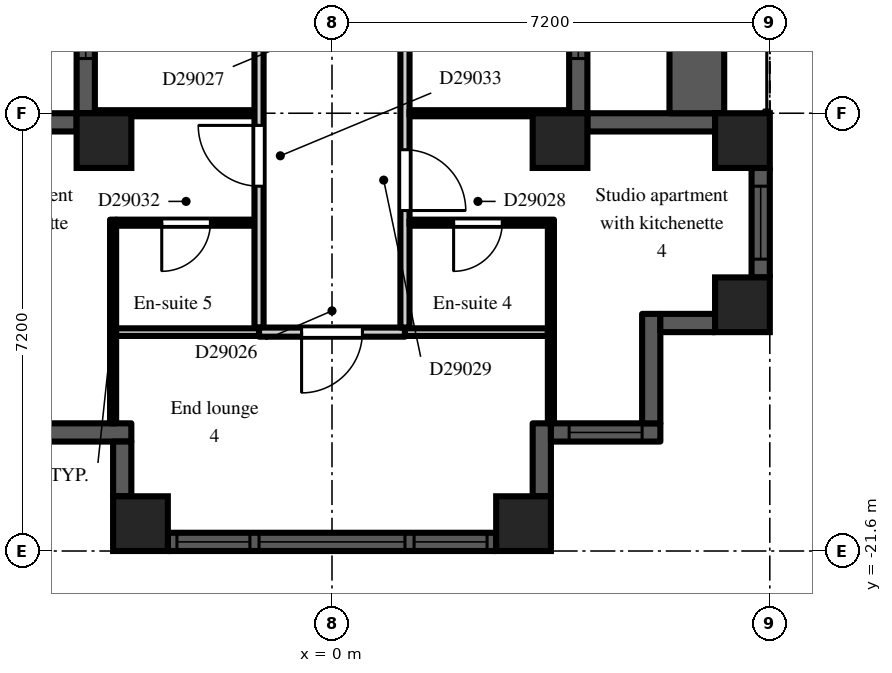
"""IFC4 building model, lengths in metres.
Left out: names, types, materials, properties, quantities, classifications, styles, units other than length and angle.
Written with IfcOpenShell. Run it as: python <this file> out.ifc"""

import sys

from ifc_helpers import new_model, si_unit, direction, frame, frame_2d, origin, origin_2d, place, context, subcontext, project, spatial, rectangle, extrude, element, fill, save


model = new_model("IFC4")
c1 = context("Model", 3, precision=1e-05, world=origin(), true_north=direction((0.0, 1.0)))
c2 = subcontext(c1, "Body", "Model", "MODEL_VIEW")
j1 = project(units=[si_unit("LENGTHUNIT", "METRE"), si_unit("PLANEANGLEUNIT", "RADIAN")], contexts=[c1])
p1 = place(None, origin())
s1 = spatial("IfcSite", under=j1, at=p1, CompositionType="ELEMENT")
p2 = place(p1, origin())
s2 = spatial("IfcBuilding", under=s1, at=p2, CompositionType="ELEMENT")
p3 = place(p2, frame((0.0, 0.0, 201.9)))
s3 = spatial("IfcBuildingStorey", under=s2, at=p3, CompositionType="ELEMENT", Elevation=201.9)
for number, where, z_axis, x_axis in (
    (1, (-3.75, -14.85, 0.0), (0.0, 0.0, 1.0), (1.0, 0.0, 0.0)),
    (2, (-3.15, -21.15, 0.0), (0.0, 0.0, 1.0), (1.0, 0.0, 0.0)),
    (3, (3.15, -21.15, 0.0), (0.0, 0.0, 1.0), (1.0, 0.0, 0.0)),
    (4, (3.75, -14.85, 0.0), (0.0, 0.0, 1.0), (1.0, 0.0, 0.0)),
    (5, (6.75, -17.55, 0.0), (0.0, 0.0, 1.0), (1.0, 0.0, 0.0)),
    (6, (6.75, -14.85, 0.0), (0.0, 0.0, 1.0), (1.0, 0.0, 0.0)),
):
    element("IfcColumn", number, at=place(p3, frame(where, z_axis=z_axis, x_axis=x_axis)), inside=s3, PredefinedType="COLUMN", context=c2, shape_type="SweptSolid", body=[
        extrude(rectangle(XDim=0.9, YDim=0.9, at=origin_2d()), origin(), (0.0, 0.0, 1.0), 3.0),
    ])
p4 = place(p3, frame((-4.05, -7.2, 0.0), z_axis=(0.0, 0.0, 1.0), x_axis=(0.0, -1.0, 0.0)))
e7 = element("IfcWall", 7, at=p4, inside=s3, PredefinedType="SOLIDWALL", context=c2, shape_type="SweptSolid", body=[
    extrude(rectangle(XDim=7.2, YDim=0.3, at=frame_2d((3.6, 0.0))), origin(), (0.0, 0.0, 1.0), 2.3),
])
p5 = place(p4, frame((3.0, 0.0, 0.0)))
e8 = element("IfcOpeningElement", 8, at=p5, cuts=e7, PredefinedType="OPENING", context=c2, shape_type="SweptSolid", body=[
    extrude(rectangle(XDim=1.2, YDim=2.05, at=frame_2d((0.6, 1.025))), frame((0.0, 0.16, 0.0), z_axis=(0.0, -1.0, 0.0), x_axis=(1.0, 0.0, 0.0)), (0.0, 0.0, 1.0), 0.32),
])
p6 = place(p4, frame((0.9, 0.0, 0.2)))
e9 = element("IfcOpeningElement", 9, at=p6, cuts=e7, PredefinedType="OPENING", context=c2, shape_type="SweptSolid", body=[
    extrude(rectangle(XDim=1.8, YDim=1.85, at=frame_2d((0.9, 0.925))), frame((0.0, 0.16, 0.0), z_axis=(0.0, -1.0, 0.0), x_axis=(1.0, 0.0, 0.0)), (0.0, 0.0, 1.0), 0.32),
])
p7 = place(p4, frame((4.5, 0.0, 0.2)))
e10 = element("IfcOpeningElement", 10, at=p7, cuts=e7, PredefinedType="OPENING", context=c2, shape_type="SweptSolid", body=[
    extrude(rectangle(XDim=1.8, YDim=1.85, at=frame_2d((0.9, 0.925))), frame((0.0, 0.16, 0.0), z_axis=(0.0, -1.0, 0.0), x_axis=(1.0, 0.0, 0.0)), (0.0, 0.0, 1.0), 0.32),
])
p8 = place(p3, frame((-4.2, -14.55, 0.0), z_axis=(0.0, 0.0, 1.0), x_axis=(-1.0, 0.0, 0.0)))
e11 = element("IfcWall", 11, at=p8, inside=s3, PredefinedType="SOLIDWALL", context=c2, shape_type="SweptSolid", body=[
    extrude(rectangle(XDim=2.1, YDim=0.3, at=frame_2d((1.05, 0.0))), origin(), (0.0, 0.0, 1.0), 2.3),
])
p9 = place(p3, frame((-5.1, -19.65, 0.0), z_axis=(0.0, 0.0, 1.0), x_axis=(1.0, 0.0, 0.0)))
e12 = element("IfcWall", 12, at=p9, inside=s3, PredefinedType="SOLIDWALL", context=c2, shape_type="SweptSolid", body=[
    extrude(rectangle(XDim=1.8, YDim=0.3, at=frame_2d((0.9, 0.0))), origin(), (0.0, 0.0, 1.0), 2.6),
])
p10 = place(p3, frame((-3.45, -19.8, 0.0), z_axis=(0.0, 0.0, 1.0), x_axis=(0.0, -1.0, 0.0)))
e13 = element("IfcWall", 13, at=p10, inside=s3, PredefinedType="SOLIDWALL", context=c2, shape_type="SweptSolid", body=[
    extrude(rectangle(XDim=0.9, YDim=0.3, at=frame_2d((0.45, 0.0))), origin(), (0.0, 0.0, 1.0), 2.6),
])
p11 = place(p3, frame((-2.7, -21.45, 0.0), z_axis=(0.0, 0.0, 1.0), x_axis=(1.0, 0.0, 0.0)))
e14 = element("IfcWall", 14, at=p11, inside=s3, PredefinedType="SOLIDWALL", context=c2, shape_type="SweptSolid", body=[
    extrude(rectangle(XDim=5.4, YDim=0.3, at=frame_2d((2.7, 0.0))), origin(), (0.0, 0.0, 1.0), 2.3),
])
p12 = place(p11, frame((1.5, 0.0, 0.2)))
e15 = element("IfcOpeningElement", 15, at=p12, cuts=e14, PredefinedType="OPENING", context=c2, shape_type="SweptSolid", body=[
    extrude(rectangle(XDim=2.4, YDim=1.85, at=frame_2d((1.2, 0.925))), frame((0.0, 0.16, 0.0), z_axis=(0.0, -1.0, 0.0), x_axis=(1.0, 0.0, 0.0)), (0.0, 0.0, 1.0), 0.32),
])
p13 = place(p11, frame((0.15, 0.0, 0.2)))
e16 = element("IfcOpeningElement", 16, at=p13, cuts=e14, PredefinedType="OPENING", context=c2, shape_type="SweptSolid", body=[
    extrude(rectangle(XDim=1.2, YDim=1.85, at=frame_2d((0.6, 0.925))), frame((0.0, 0.16, 0.0), z_axis=(0.0, -1.0, 0.0), x_axis=(1.0, 0.0, 0.0)), (0.0, 0.0, 1.0), 0.32),
])
p14 = place(p11, frame((4.05, 0.0, 0.2)))
e17 = element("IfcOpeningElement", 17, at=p14, cuts=e14, PredefinedType="OPENING", context=c2, shape_type="SweptSolid", body=[
    extrude(rectangle(XDim=1.2, YDim=1.85, at=frame_2d((0.6, 0.925))), frame((0.0, 0.16, 0.0), z_axis=(0.0, -1.0, 0.0), x_axis=(1.0, 0.0, 0.0)), (0.0, 0.0, 1.0), 0.32),
])
p15 = place(p3, frame((3.45, -20.7, 0.0), z_axis=(0.0, 0.0, 1.0), x_axis=(0.0, 1.0, 0.0)))
e18 = element("IfcWall", 18, at=p15, inside=s3, PredefinedType="SOLIDWALL", context=c2, shape_type="SweptSolid", body=[
    extrude(rectangle(XDim=1.2, YDim=0.3, at=frame_2d((0.6, 0.0))), origin(), (0.0, 0.0, 1.0), 2.6),
])
p16 = place(p3, frame((3.6, -19.65, 0.0), z_axis=(0.0, 0.0, 1.0), x_axis=(1.0, 0.0, 0.0)))
e19 = element("IfcWall", 19, at=p16, inside=s3, PredefinedType="SOLIDWALL", context=c2, shape_type="SweptSolid", body=[
    extrude(rectangle(XDim=1.8, YDim=0.3, at=frame_2d((0.9, 0.0))), origin(), (0.0, 0.0, 1.0), 2.6),
])
p17 = place(p16, frame((0.3, 0.0, 0.2)))
e20 = element("IfcOpeningElement", 20, at=p17, cuts=e19, PredefinedType="OPENING", context=c2, shape_type="SweptSolid", body=[
    extrude(rectangle(XDim=1.2, YDim=1.85, at=frame_2d((0.6, 0.925))), frame((0.0, 0.16, 0.0), z_axis=(0.0, -1.0, 0.0), x_axis=(1.0, 0.0, 0.0)), (0.0, 0.0, 1.0), 0.32),
])
p18 = place(p3, frame((5.25, -19.5, 0.0), z_axis=(0.0, 0.0, 1.0), x_axis=(0.0, 1.0, 0.0)))
e21 = element("IfcWall", 21, at=p18, inside=s3, PredefinedType="SOLIDWALL", context=c2, shape_type="SweptSolid", body=[
    extrude(rectangle(XDim=1.8, YDim=0.3, at=frame_2d((0.9, 0.0))), origin(), (0.0, 0.0, 1.0), 2.6),
])
p19 = place(p3, frame((5.4, -17.85, 0.0), z_axis=(0.0, 0.0, 1.0), x_axis=(1.0, 0.0, 0.0)))
e22 = element("IfcWall", 22, at=p19, inside=s3, PredefinedType="SOLIDWALL", context=c2, shape_type="SweptSolid", body=[
    extrude(rectangle(XDim=0.9, YDim=0.3, at=frame_2d((0.45, 0.0))), origin(), (0.0, 0.0, 1.0), 2.6),
])
p20 = place(p3, frame((7.05, -17.1, 0.0), z_axis=(0.0, 0.0, 1.0), x_axis=(0.0, 1.0, 0.0)))
e23 = element("IfcWall", 23, at=p20, inside=s3, PredefinedType="SOLIDWALL", context=c2, shape_type="SweptSolid", body=[
    extrude(rectangle(XDim=1.8, YDim=0.3, at=frame_2d((0.9, 0.0))), origin(), (0.0, 0.0, 1.0), 2.3),
])
p21 = place(p20, frame((0.3, 0.0, 0.2)))
e24 = element("IfcOpeningElement", 24, at=p21, cuts=e23, PredefinedType="OPENING", context=c2, shape_type="SweptSolid", body=[
    extrude(rectangle(XDim=1.2, YDim=1.85, at=frame_2d((0.6, 0.925))), frame((0.0, 0.16, 0.0), z_axis=(0.0, -1.0, 0.0), x_axis=(1.0, 0.0, 0.0)), (0.0, 0.0, 1.0), 0.32),
])
p22 = place(p3, frame((6.3, -14.55, 0.0), z_axis=(0.0, 0.0, 1.0), x_axis=(-1.0, 0.0, 0.0)))
e25 = element("IfcWall", 25, at=p22, inside=s3, PredefinedType="SOLIDWALL", context=c2, shape_type="SweptSolid", body=[
    extrude(rectangle(XDim=2.1, YDim=0.3, at=frame_2d((1.05, 0.0))), origin(), (0.0, 0.0, 1.0), 2.3),
])
p23 = place(p3, frame((4.05, -14.4, 0.0), z_axis=(0.0, 0.0, 1.0), x_axis=(0.0, 1.0, 0.0)))
e26 = element("IfcWall", 26, at=p23, inside=s3, PredefinedType="SOLIDWALL", context=c2, shape_type="SweptSolid", body=[
    extrude(rectangle(XDim=7.2, YDim=0.3, at=frame_2d((3.6, 0.0))), origin(), (0.0, 0.0, 1.0), 2.3),
])
p24 = place(p23, frame((3.0, 0.0, 0.0)))
e27 = element("IfcOpeningElement", 27, at=p24, cuts=e26, PredefinedType="OPENING", context=c2, shape_type="SweptSolid", body=[
    extrude(rectangle(XDim=1.2, YDim=2.05, at=frame_2d((0.6, 1.025))), frame((0.0, 0.16, 0.0), z_axis=(0.0, -1.0, 0.0), x_axis=(1.0, 0.0, 0.0)), (0.0, 0.0, 1.0), 0.32),
])
p25 = place(p23, frame((0.9, 0.0, 0.2)))
e28 = element("IfcOpeningElement", 28, at=p25, cuts=e26, PredefinedType="OPENING", context=c2, shape_type="SweptSolid", body=[
    extrude(rectangle(XDim=1.8, YDim=1.85, at=frame_2d((0.9, 0.925))), frame((0.0, 0.16, 0.0), z_axis=(0.0, -1.0, 0.0), x_axis=(1.0, 0.0, 0.0)), (0.0, 0.0, 1.0), 0.32),
])
p26 = place(p23, frame((4.5, 0.0, 0.2)))
e29 = element("IfcOpeningElement", 29, at=p26, cuts=e26, PredefinedType="OPENING", context=c2, shape_type="SweptSolid", body=[
    extrude(rectangle(XDim=1.8, YDim=1.85, at=frame_2d((0.9, 0.925))), frame((0.0, 0.16, 0.0), z_axis=(0.0, -1.0, 0.0), x_axis=(1.0, 0.0, 0.0)), (0.0, 0.0, 1.0), 0.32),
])
p27 = place(p3, frame((6.0, -14.4, 0.0), z_axis=(0.0, 0.0, 1.0), x_axis=(0.0, 1.0, 0.0)))
e30 = element("IfcWall", 30, at=p27, inside=s3, PredefinedType="PARAPET", context=c2, shape_type="SweptSolid", body=[
    extrude(rectangle(XDim=7.2, YDim=0.9, at=frame_2d((3.6, 0.0))), origin(), (0.0, 0.0, 1.0), 0.8),
])
p28 = place(p3, frame((-3.9, -14.4, 0.0), z_axis=(0.0, 0.0, 1.0), x_axis=(1.0, 0.0, 0.0)))
e31 = element("IfcWall", 31, at=p28, inside=s3, PredefinedType="PARTITIONING", context=c2, shape_type="SweptSolid", body=[
    extrude(rectangle(XDim=2.625, YDim=0.1, at=frame_2d((1.312, 0.0))), origin(), (0.0, 0.0, 1.0), 2.6),
])
p29 = place(p3, frame((-3.6, -19.5, 0.0), z_axis=(0.0, 0.0, 1.0), x_axis=(0.0, 1.0, 0.0)))
e32 = element("IfcWall", 32, at=p29, inside=s3, PredefinedType="PARTITIONING", context=c2, shape_type="SweptSolid", body=[
    extrude(rectangle(XDim=3.35, YDim=0.1, at=frame_2d((1.675, 0.0))), origin(), (0.0, 0.0, 1.0), 2.6),
])
p30 = place(p3, frame((-3.55, -18.0, 0.0), z_axis=(0.0, 0.0, 1.0), x_axis=(1.0, 0.0, 0.0)))
e33 = element("IfcWall", 33, at=p30, inside=s3, PredefinedType="PARTITIONING", context=c2, shape_type="SweptSolid", body=[
    extrude(rectangle(XDim=2.35, YDim=0.125, at=frame_2d((1.175, 0.0))), origin(), (0.0, 0.0, 1.0), 2.6),
])
p31 = place(p3, frame((-3.55, -16.2, 0.0), z_axis=(0.0, 0.0, 1.0), x_axis=(1.0, 0.0, 0.0)))
e34 = element("IfcWall", 34, at=p31, inside=s3, PredefinedType="PARTITIONING", context=c2, shape_type="SweptSolid", body=[
    extrude(rectangle(XDim=2.275, YDim=0.1, at=frame_2d((1.138, 0.0))), origin(), (0.0, 0.0, 1.0), 2.6),
])
p32 = place(p31, frame((0.75, 0.0, 0.0)))
e35 = element("IfcOpeningElement", 35, at=p32, cuts=e34, PredefinedType="OPENING", context=c2, shape_type="SweptSolid", body=[
    extrude(rectangle(XDim=0.8, YDim=2.1, at=frame_2d((0.4, 1.05))), frame((0.0, 0.06, 0.0), z_axis=(0.0, -1.0, 0.0), x_axis=(1.0, 0.0, 0.0)), (0.0, 0.0, 1.0), 0.12),
])
p33 = place(p3, frame((-1.2, -17.925, 0.0), z_axis=(0.0, 0.0, 1.0), x_axis=(0.0, 1.0, 0.0)))
e36 = element("IfcWall", 36, at=p33, inside=s3, PredefinedType="PARTITIONING", context=c2, shape_type="SweptSolid", body=[
    extrude(rectangle(XDim=16.65, YDim=0.15, at=frame_2d((8.325, 0.0))), origin(), (0.0, 0.0, 1.0), 2.6),
])
p34 = place(p33, frame((12.175, 0.0, 0.0)))
e37 = element("IfcOpeningElement", 37, at=p34, cuts=e36, PredefinedType="OPENING", context=c2, shape_type="SweptSolid", body=[
    extrude(rectangle(XDim=0.9, YDim=2.1, at=frame_2d((0.45, 1.05))), frame((0.0, 0.085, 0.0), z_axis=(0.0, -1.0, 0.0), x_axis=(1.0, 0.0, 0.0)), (0.0, 0.0, 1.0), 0.17),
])
p35 = place(p33, frame((8.875, 0.0, 0.0)))
e38 = element("IfcOpeningElement", 38, at=p35, cuts=e36, PredefinedType="OPENING", context=c2, shape_type="SweptSolid", body=[
    extrude(rectangle(XDim=0.9, YDim=2.1, at=frame_2d((0.45, 1.05))), frame((0.0, 0.085, 0.0), z_axis=(0.0, -1.0, 0.0), x_axis=(1.0, 0.0, 0.0)), (0.0, 0.0, 1.0), 0.17),
])
p36 = place(p33, frame((5.275, 0.0, 0.0)))
e39 = element("IfcOpeningElement", 39, at=p36, cuts=e36, PredefinedType="OPENING", context=c2, shape_type="SweptSolid", body=[
    extrude(rectangle(XDim=0.9, YDim=2.1, at=frame_2d((0.45, 1.05))), frame((0.0, 0.085, 0.0), z_axis=(0.0, -1.0, 0.0), x_axis=(1.0, 0.0, 0.0)), (0.0, 0.0, 1.0), 0.17),
])
p37 = place(p33, frame((2.325, 0.0, 0.0)))
e40 = element("IfcOpeningElement", 40, at=p37, cuts=e36, PredefinedType="OPENING", context=c2, shape_type="SweptSolid", body=[
    extrude(rectangle(XDim=1.0, YDim=2.1, at=frame_2d((0.5, 1.05))), frame((0.0, 0.085, 0.0), z_axis=(0.0, -1.0, 0.0), x_axis=(1.0, 0.0, 0.0)), (0.0, 0.0, 1.0), 0.17),
])
p38 = place(p3, frame((-1.2, -18.0, 0.0), z_axis=(0.0, 0.0, 1.0), x_axis=(1.0, 0.0, 0.0)))
e41 = element("IfcWall", 41, at=p38, inside=s3, PredefinedType="PARTITIONING", context=c2, shape_type="SweptSolid", body=[
    extrude(rectangle(XDim=2.4, YDim=0.15, at=frame_2d((1.2, 0.0))), origin(), (0.0, 0.0, 1.0), 2.6),
])
p39 = place(p38, frame((0.7, 0.0, 0.0)))
e42 = element("IfcOpeningElement", 42, at=p39, cuts=e41, PredefinedType="OPENING", context=c2, shape_type="SweptSolid", body=[
    extrude(rectangle(XDim=1.0, YDim=2.1, at=frame_2d((0.5, 1.05))), frame((0.0, 0.085, 0.0), z_axis=(0.0, -1.0, 0.0), x_axis=(1.0, 0.0, 0.0)), (0.0, 0.0, 1.0), 0.17),
])
p40 = place(p3, frame((1.2, -17.925, 0.0), z_axis=(0.0, 0.0, 1.0), x_axis=(0.0, 1.0, 0.0)))
e43 = element("IfcWall", 43, at=p40, inside=s3, PredefinedType="PARTITIONING", context=c2, shape_type="SweptSolid", body=[
    extrude(rectangle(XDim=16.8, YDim=0.15, at=frame_2d((8.4, 0.0))), origin(), (0.0, 0.0, 1.0), 2.6),
])
p41 = place(p40, frame((15.075, 0.0, 0.0)))
e44 = element("IfcOpeningElement", 44, at=p41, cuts=e43, PredefinedType="OPENING", context=c2, shape_type="SweptSolid", body=[
    extrude(rectangle(XDim=0.9, YDim=2.1, at=frame_2d((0.45, 1.05))), frame((0.0, 0.085, 0.0), z_axis=(0.0, -1.0, 0.0), x_axis=(1.0, 0.0, 0.0)), (0.0, 0.0, 1.0), 0.17),
])
p42 = place(p40, frame((12.075, 0.0, 0.0)))
e45 = element("IfcOpeningElement", 45, at=p42, cuts=e43, PredefinedType="OPENING", context=c2, shape_type="SweptSolid", body=[
    extrude(rectangle(XDim=0.9, YDim=2.1, at=frame_2d((0.45, 1.05))), frame((0.0, 0.085, 0.0), z_axis=(0.0, -1.0, 0.0), x_axis=(1.0, 0.0, 0.0)), (0.0, 0.0, 1.0), 0.17),
])
p43 = place(p40, frame((4.875, 0.0, 0.0)))
e46 = element("IfcOpeningElement", 46, at=p43, cuts=e43, PredefinedType="OPENING", context=c2, shape_type="SweptSolid", body=[
    extrude(rectangle(XDim=0.9, YDim=2.1, at=frame_2d((0.45, 1.05))), frame((0.0, 0.085, 0.0), z_axis=(0.0, -1.0, 0.0), x_axis=(1.0, 0.0, 0.0)), (0.0, 0.0, 1.0), 0.17),
])
p44 = place(p40, frame((1.925, 0.0, 0.0)))
e47 = element("IfcOpeningElement", 47, at=p44, cuts=e43, PredefinedType="OPENING", context=c2, shape_type="SweptSolid", body=[
    extrude(rectangle(XDim=1.0, YDim=2.1, at=frame_2d((0.5, 1.05))), frame((0.0, 0.085, 0.0), z_axis=(0.0, -1.0, 0.0), x_axis=(1.0, 0.0, 0.0)), (0.0, 0.0, 1.0), 0.17),
])
p45 = place(p3, frame((1.2, -18.0, 0.0), z_axis=(0.0, 0.0, 1.0), x_axis=(1.0, 0.0, 0.0)))
e48 = element("IfcWall", 48, at=p45, inside=s3, PredefinedType="PARTITIONING", context=c2, shape_type="SweptSolid", body=[
    extrude(rectangle(XDim=2.35, YDim=0.125, at=frame_2d((1.175, 0.0))), origin(), (0.0, 0.0, 1.0), 2.6),
])
p46 = place(p3, frame((1.275, -16.2, 0.0), z_axis=(0.0, 0.0, 1.0), x_axis=(1.0, 0.0, 0.0)))
e49 = element("IfcWall", 49, at=p46, inside=s3, PredefinedType="PARTITIONING", context=c2, shape_type="SweptSolid", body=[
    extrude(rectangle(XDim=2.375, YDim=0.1, at=frame_2d((1.188, 0.0))), origin(), (0.0, 0.0, 1.0), 2.6),
])
p47 = place(p46, frame((0.725, 0.0, 0.0)))
e50 = element("IfcOpeningElement", 50, at=p47, cuts=e49, PredefinedType="OPENING", context=c2, shape_type="SweptSolid", body=[
    extrude(rectangle(XDim=0.8, YDim=2.1, at=frame_2d((0.4, 1.05))), frame((0.0, 0.06, 0.0), z_axis=(0.0, -1.0, 0.0), x_axis=(1.0, 0.0, 0.0)), (0.0, 0.0, 1.0), 0.12),
])
p48 = place(p3, frame((1.275, -14.4, 0.0), z_axis=(0.0, 0.0, 1.0), x_axis=(1.0, 0.0, 0.0)))
e51 = element("IfcWall", 51, at=p48, inside=s3, PredefinedType="PARTITIONING", context=c2, shape_type="SweptSolid", body=[
    extrude(rectangle(XDim=2.625, YDim=0.1, at=frame_2d((1.312, 0.0))), origin(), (0.0, 0.0, 1.0), 2.6),
])
p49 = place(p3, frame((3.6, -19.5, 0.0), z_axis=(0.0, 0.0, 1.0), x_axis=(0.0, 1.0, 0.0)))
e52 = element("IfcWall", 52, at=p49, inside=s3, PredefinedType="PARTITIONING", context=c2, shape_type="SweptSolid", body=[
    extrude(rectangle(XDim=3.25, YDim=0.1, at=frame_2d((1.625, 0.0))), origin(), (0.0, 0.0, 1.0), 2.6),
])
p50 = place(p7, origin())
e53 = element("IfcWindow", 53, at=p50, inside=s3, PartitioningType="SINGLE_PANEL", PredefinedType="WINDOW", context=c2, shape_type="SweptSolid", body=[
    extrude(rectangle(XDim=1.8, YDim=1.85, at=frame_2d((0.9, 0.925))), frame((0.0, 0.03, 0.0), z_axis=(0.0, -1.0, 0.0), x_axis=(1.0, 0.0, 0.0)), (0.0, 0.0, 1.0), 0.06),
])
fill(e10, e53)
p51 = place(p12, origin())
e54 = element("IfcWindow", 54, at=p51, inside=s3, PartitioningType="SINGLE_PANEL", PredefinedType="WINDOW", context=c2, shape_type="SweptSolid", body=[
    extrude(rectangle(XDim=2.4, YDim=1.85, at=frame_2d((1.2, 0.925))), frame((0.0, 0.03, 0.0), z_axis=(0.0, -1.0, 0.0), x_axis=(1.0, 0.0, 0.0)), (0.0, 0.0, 1.0), 0.06),
])
fill(e15, e54)
p52 = place(p13, origin())
e55 = element("IfcWindow", 55, at=p52, inside=s3, PartitioningType="SINGLE_PANEL", PredefinedType="WINDOW", context=c2, shape_type="SweptSolid", body=[
    extrude(rectangle(XDim=1.2, YDim=1.85, at=frame_2d((0.6, 0.925))), frame((0.0, 0.03, 0.0), z_axis=(0.0, -1.0, 0.0), x_axis=(1.0, 0.0, 0.0)), (0.0, 0.0, 1.0), 0.06),
])
fill(e16, e55)
p53 = place(p14, origin())
e56 = element("IfcWindow", 56, at=p53, inside=s3, PartitioningType="SINGLE_PANEL", PredefinedType="WINDOW", context=c2, shape_type="SweptSolid", body=[
    extrude(rectangle(XDim=1.2, YDim=1.85, at=frame_2d((0.6, 0.925))), frame((0.0, 0.03, 0.0), z_axis=(0.0, -1.0, 0.0), x_axis=(1.0, 0.0, 0.0)), (0.0, 0.0, 1.0), 0.06),
])
fill(e17, e56)
p54 = place(p17, origin())
e57 = element("IfcWindow", 57, at=p54, inside=s3, PartitioningType="SINGLE_PANEL", PredefinedType="WINDOW", context=c2, shape_type="SweptSolid", body=[
    extrude(rectangle(XDim=1.2, YDim=1.85, at=frame_2d((0.6, 0.925))), frame((0.0, 0.03, 0.0), z_axis=(0.0, -1.0, 0.0), x_axis=(1.0, 0.0, 0.0)), (0.0, 0.0, 1.0), 0.06),
])
fill(e20, e57)
p55 = place(p21, origin())
e58 = element("IfcWindow", 58, at=p55, inside=s3, PartitioningType="SINGLE_PANEL", PredefinedType="WINDOW", context=c2, shape_type="SweptSolid", body=[
    extrude(rectangle(XDim=1.2, YDim=1.85, at=frame_2d((0.6, 0.925))), frame((0.0, 0.03, 0.0), z_axis=(0.0, -1.0, 0.0), x_axis=(1.0, 0.0, 0.0)), (0.0, 0.0, 1.0), 0.06),
])
fill(e24, e58)
p56 = place(p25, origin())
e59 = element("IfcWindow", 59, at=p56, inside=s3, PartitioningType="SINGLE_PANEL", PredefinedType="WINDOW", context=c2, shape_type="SweptSolid", body=[
    extrude(rectangle(XDim=1.8, YDim=1.85, at=frame_2d((0.9, 0.925))), frame((0.0, 0.03, 0.0), z_axis=(0.0, -1.0, 0.0), x_axis=(1.0, 0.0, 0.0)), (0.0, 0.0, 1.0), 0.06),
])
fill(e28, e59)
p57 = place(p39, frame((1.0, 0.0, 0.0), z_axis=(0.0, 0.0, 1.0), x_axis=(-1.0, 0.0, 0.0)))
e60 = element("IfcDoor", 60, at=p57, inside=s3, OperationType="SINGLE_SWING_RIGHT", PredefinedType="DOOR", context=c2, shape_type="SweptSolid", body=[
    extrude(rectangle(XDim=1.0, YDim=2.1, at=frame_2d((0.5, 1.05))), frame((0.0, 0.025, 0.0), z_axis=(0.0, -1.0, 0.0), x_axis=(1.0, 0.0, 0.0)), (0.0, 0.0, 1.0), 0.05),
])
fill(e42, e60)
p58 = place(p47, frame((0.8, 0.0, 0.0), z_axis=(0.0, 0.0, 1.0), x_axis=(-1.0, 0.0, 0.0)))
e61 = element("IfcDoor", 61, at=p58, inside=s3, OperationType="SINGLE_SWING_RIGHT", PredefinedType="DOOR", context=c2, shape_type="SweptSolid", body=[
    extrude(rectangle(XDim=0.8, YDim=2.1, at=frame_2d((0.4, 1.05))), frame((0.0, 0.025, 0.0), z_axis=(0.0, -1.0, 0.0), x_axis=(1.0, 0.0, 0.0)), (0.0, 0.0, 1.0), 0.05),
])
fill(e50, e61)
p59 = place(p44, frame((1.0, 0.0, 0.0), z_axis=(0.0, 0.0, 1.0), x_axis=(-1.0, 0.0, 0.0)))
e62 = element("IfcDoor", 62, at=p59, inside=s3, OperationType="SINGLE_SWING_RIGHT", PredefinedType="DOOR", context=c2, shape_type="SweptSolid", body=[
    extrude(rectangle(XDim=1.0, YDim=2.1, at=frame_2d((0.5, 1.05))), frame((0.0, 0.025, 0.0), z_axis=(0.0, -1.0, 0.0), x_axis=(1.0, 0.0, 0.0)), (0.0, 0.0, 1.0), 0.05),
])
fill(e47, e62)
p60 = place(p32, frame((0.8, 0.0, 0.0), z_axis=(0.0, 0.0, 1.0), x_axis=(-1.0, 0.0, 0.0)))
e63 = element("IfcDoor", 63, at=p60, inside=s3, OperationType="SINGLE_SWING_RIGHT", PredefinedType="DOOR", context=c2, shape_type="SweptSolid", body=[
    extrude(rectangle(XDim=0.8, YDim=2.1, at=frame_2d((0.4, 1.05))), frame((0.0, 0.025, 0.0), z_axis=(0.0, -1.0, 0.0), x_axis=(1.0, 0.0, 0.0)), (0.0, 0.0, 1.0), 0.05),
])
fill(e35, e63)
p61 = place(p37, origin())
e64 = element("IfcDoor", 64, at=p61, inside=s3, OperationType="SINGLE_SWING_RIGHT", PredefinedType="DOOR", context=c2, shape_type="SweptSolid", body=[
    extrude(rectangle(XDim=1.0, YDim=2.1, at=frame_2d((0.5, 1.05))), frame((0.0, 0.025, 0.0), z_axis=(0.0, -1.0, 0.0), x_axis=(1.0, 0.0, 0.0)), (0.0, 0.0, 1.0), 0.05),
])
fill(e40, e64)
save(model, sys.argv[1])
